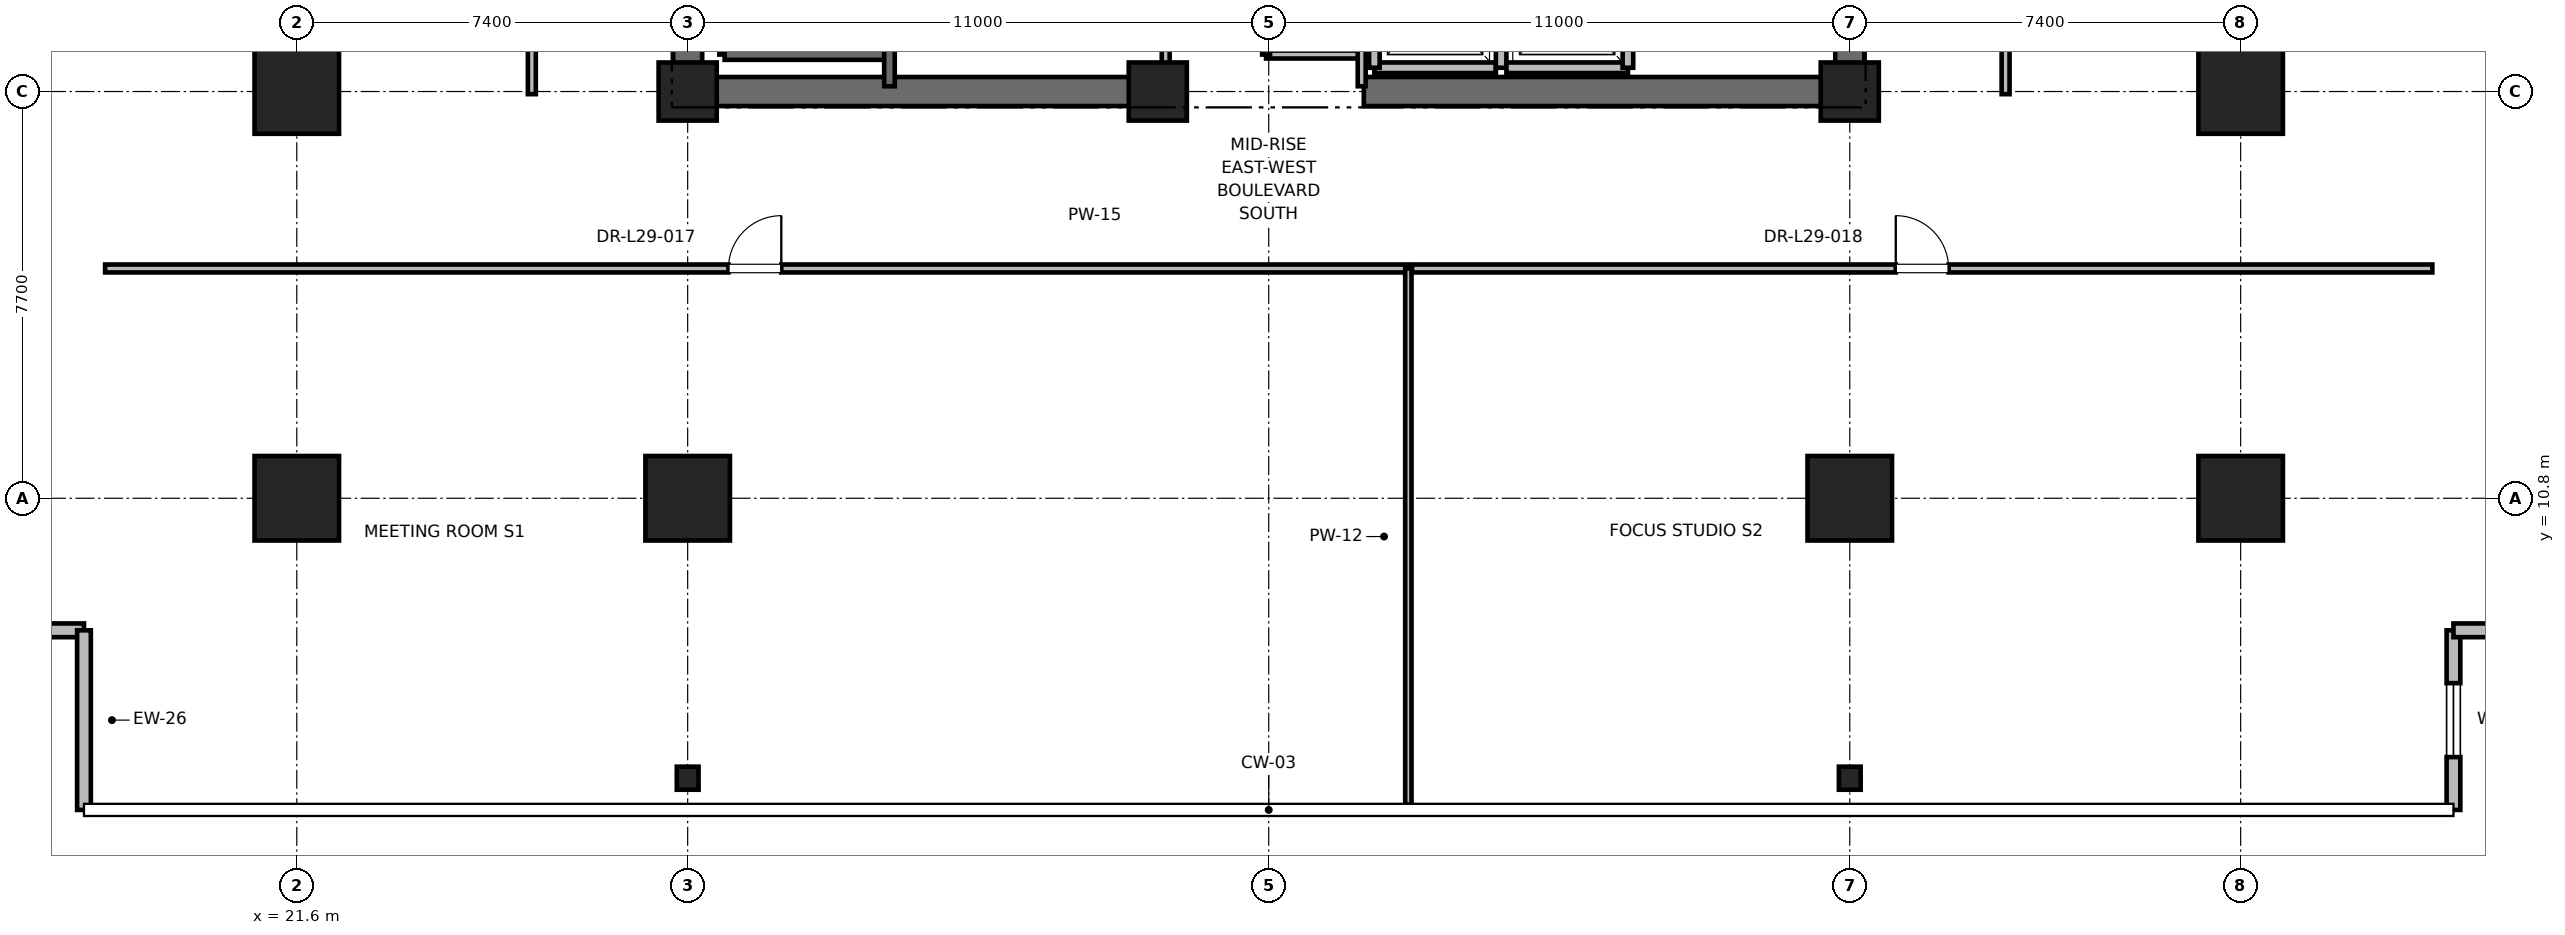
"""IFC4 building model, lengths in metres.
Left out: names, types, materials, properties, quantities, classifications, styles, units other than length and angle.
Written with IfcOpenShell. Run it as: python <this file> out.ifc"""

import sys

from ifc_helpers import new_model, si_unit, direction, frame, frame_2d, origin, origin_2d, place, context, subcontext, project, spatial, rectangle, i_section, extrude, element, fill, save


model = new_model("IFC4")
c1 = context("Model", 3, precision=1e-05, world=origin(), true_north=direction((0.0, 1.0)))
c2 = subcontext(c1, "Body", "Model", "MODEL_VIEW")
j1 = project(units=[si_unit("LENGTHUNIT", "METRE"), si_unit("PLANEANGLEUNIT", "RADIAN")], contexts=[c1])
p1 = place(None, origin())
s1 = spatial("IfcSite", under=j1, at=p1, CompositionType="ELEMENT")
p2 = place(p1, origin())
s2 = spatial("IfcBuilding", under=s1, at=p2, CompositionType="ELEMENT")
p3 = place(p2, frame((0.0, 0.0, 128.4)))
s3 = spatial("IfcBuildingStorey", under=s2, at=p3, CompositionType="ELEMENT", Elevation=128.4)
for number, where, z_axis, x_axis in (
    (1, (29.0, 10.8, 0.0), (0.0, 0.0, 1.0), (1.0, 0.0, 0.0)),
    (2, (51.0, 10.8, 0.0), (0.0, 0.0, 1.0), (1.0, 0.0, 0.0)),
    (3, (21.6, 18.5, 0.0), (0.0, 0.0, 1.0), (1.0, 0.0, 0.0)),
    (4, (58.4, 18.5, 0.0), (0.0, 0.0, 1.0), (1.0, 0.0, 0.0)),
    (5, (21.6, 10.8, 0.0), (0.0, 0.0, 1.0), (1.0, 0.0, 0.0)),
    (6, (58.4, 10.8, 0.0), (0.0, 0.0, 1.0), (1.0, 0.0, 0.0)),
):
    element("IfcColumn", number, at=place(p3, frame(where, z_axis=z_axis, x_axis=x_axis)), inside=s3, PredefinedType="COLUMN", context=c2, shape_type="SweptSolid", body=[
        extrude(rectangle(XDim=1.6, YDim=1.6, at=origin_2d()), origin(), (0.0, 0.0, 1.0), 4.0),
    ])
for number, where, z_axis, x_axis in (
    (7, (29.0, 5.5, 0.0), (0.0, 0.0, 1.0), (1.0, 0.0, 0.0)),
    (8, (51.0, 5.5, 0.0), (0.0, 0.0, 1.0), (1.0, 0.0, 0.0)),
):
    element("IfcColumn", number, at=place(p3, frame(where, z_axis=z_axis, x_axis=x_axis)), inside=s3, PredefinedType="COLUMN", context=c2, shape_type="SweptSolid", body=[
        extrude(i_section(OverallWidth=0.412, OverallDepth=0.437, WebThickness=0.036, FlangeThickness=0.058, FilletRadius=0.015, at=origin_2d()), origin(), (0.0, 0.0, 1.0), 4.0),
    ])
for number, where, z_axis, x_axis in (
    (9, (29.0, 18.5, 0.0), (0.0, 0.0, 1.0), (1.0, 0.0, 0.0)),
    (10, (51.0, 18.5, 0.0), (0.0, 0.0, 1.0), (1.0, 0.0, 0.0)),
    (11, (37.9, 18.5, 0.0), (0.0, 0.0, 1.0), (1.0, 0.0, 0.0)),
):
    element("IfcColumn", number, at=place(p3, frame(where, z_axis=z_axis, x_axis=x_axis)), inside=s3, PredefinedType="PILASTER", context=c2, shape_type="SweptSolid", body=[
        extrude(rectangle(XDim=1.1, YDim=1.1, at=origin_2d()), origin(), (0.0, 0.0, 1.0), 4.0),
    ])
for number, where, z_axis, x_axis in (
    (12, (29.0, 18.5, 0.0), (0.0, 0.0, 1.0), (1.0, 0.0, 0.0)),
    (13, (41.8, 18.5, 0.0), (0.0, 0.0, 1.0), (1.0, 0.0, 0.0)),
):
    element("IfcWall", number, at=place(p3, frame(where, z_axis=z_axis, x_axis=x_axis)), inside=s3, PredefinedType="SHEAR", context=c2, shape_type="SweptSolid", body=[
        extrude(rectangle(XDim=9.2, YDim=0.55, at=frame_2d((4.6, 0.0))), origin(), (0.0, 0.0, 1.0), 3.775),
    ])
p4 = place(p3, frame((29.0, 18.5, 0.0), z_axis=(0.0, 0.0, 1.0), x_axis=(0.0, 1.0, 0.0)))
e14 = element("IfcWall", 14, at=p4, inside=s3, PredefinedType="SHEAR", context=c2, shape_type="SweptSolid", body=[
    extrude(rectangle(XDim=8.8, YDim=0.55, at=frame_2d((4.4, 0.0))), origin(), (0.0, 0.0, 1.0), 3.775),
])
p5 = place(p3, frame((51.0, 18.5, 0.0), z_axis=(0.0, 0.0, 1.0), x_axis=(0.0, 1.0, 0.0)))
e15 = element("IfcWall", 15, at=p5, inside=s3, PredefinedType="SHEAR", context=c2, shape_type="SweptSolid", body=[
    extrude(rectangle(XDim=5.8, YDim=0.55, at=frame_2d((2.9, 0.0))), origin(), (0.0, 0.0, 1.0), 3.775),
])
p6 = place(p3, frame((13.771, 8.3, 0.0), z_axis=(0.0, 0.0, 1.0), x_axis=(1.0, 0.0, 0.0)))
e16 = element("IfcWall", 16, at=p6, inside=s3, PredefinedType="PARAPET", context=c2, shape_type="SweptSolid", body=[
    extrude(rectangle(XDim=3.8, YDim=0.26, at=frame_2d((1.9, 0.0))), origin(), (0.0, 0.0, 1.0), 3.775),
])
p7 = place(p6, frame((1.2, 0.0, 0.85)))
e17 = element("IfcOpeningElement", 17, at=p7, cuts=e16, PredefinedType="OPENING", context=c2, shape_type="SweptSolid", body=[
    extrude(rectangle(XDim=1.4, YDim=2.0, at=frame_2d((0.7, 1.0))), frame((0.0, 0.13, 0.0), z_axis=(0.0, -1.0, 0.0), x_axis=(1.0, 0.0, 0.0)), (0.0, 0.0, 1.0), 0.26),
])
p8 = place(p3, frame((17.571, 8.3, 0.0), z_axis=(0.0, 0.0, 1.0), x_axis=(0.0, -1.0, 0.0)))
e18 = element("IfcWall", 18, at=p8, inside=s3, PredefinedType="PARAPET", context=c2, shape_type="SweptSolid", body=[
    extrude(rectangle(XDim=3.4, YDim=0.26, at=frame_2d((1.7, 0.0))), origin(), (0.0, 0.0, 1.0), 3.775),
])
p9 = place(p3, frame((62.429, 4.9, 0.0), z_axis=(0.0, 0.0, 1.0), x_axis=(0.0, 1.0, 0.0)))
e19 = element("IfcWall", 19, at=p9, inside=s3, PredefinedType="PARAPET", context=c2, shape_type="SweptSolid", body=[
    extrude(rectangle(XDim=3.4, YDim=0.26, at=frame_2d((1.7, 0.0))), origin(), (0.0, 0.0, 1.0), 3.775),
])
p10 = place(p9, frame((1.0, 0.0, 0.85)))
e20 = element("IfcOpeningElement", 20, at=p10, cuts=e19, PredefinedType="OPENING", context=c2, shape_type="SweptSolid", body=[
    extrude(rectangle(XDim=1.4, YDim=2.0, at=frame_2d((0.7, 1.0))), frame((0.0, 0.13, 0.0), z_axis=(0.0, -1.0, 0.0), x_axis=(1.0, 0.0, 0.0)), (0.0, 0.0, 1.0), 0.26),
])
p11 = place(p3, frame((62.429, 8.3, 0.0), z_axis=(0.0, 0.0, 1.0), x_axis=(1.0, 0.0, 0.0)))
e21 = element("IfcWall", 21, at=p11, inside=s3, PredefinedType="PARAPET", context=c2, shape_type="SweptSolid", body=[
    extrude(rectangle(XDim=3.8, YDim=0.26, at=frame_2d((1.9, 0.0))), origin(), (0.0, 0.0, 1.0), 3.775),
])
p12 = place(p3, frame((29.7, 19.2, 0.0), z_axis=(0.0, 0.0, 1.0), x_axis=(0.0, 1.0, 0.0)))
e22 = element("IfcWall", 22, at=p12, inside=s3, PredefinedType="SOLIDWALL", context=c2, shape_type="SweptSolid", body=[
    extrude(rectangle(XDim=8.15, YDim=0.2, at=frame_2d((4.075, 0.0))), origin(), (0.0, 0.0, 1.0), 3.775),
])
p13 = place(p3, frame((29.7, 19.2, 0.0), z_axis=(0.0, 0.0, 1.0), x_axis=(1.0, 0.0, 0.0)))
e23 = element("IfcWall", 23, at=p13, inside=s3, PredefinedType="SOLIDWALL", context=c2, shape_type="SweptSolid", body=[
    extrude(rectangle(XDim=3.12, YDim=0.2, at=frame_2d((1.56, 0.0))), origin(), (0.0, 0.0, 1.0), 3.775),
])
p14 = place(p3, frame((32.82, 18.6, 0.0), z_axis=(0.0, 0.0, 1.0), x_axis=(0.0, 1.0, 0.0)))
e24 = element("IfcWall", 24, at=p14, inside=s3, PredefinedType="SOLIDWALL", context=c2, shape_type="SweptSolid", body=[
    extrude(rectangle(XDim=8.78, YDim=0.2, at=frame_2d((4.39, 0.0))), origin(), (0.0, 0.0, 1.0), 3.775),
])
p15 = place(p3, frame((42.0, 18.95, 0.0), z_axis=(0.0, 0.0, 1.0), x_axis=(1.0, 0.0, 0.0)))
e25 = element("IfcWall", 25, at=p15, inside=s3, PredefinedType="SOLIDWALL", context=c2, shape_type="SweptSolid", body=[
    extrude(rectangle(XDim=2.3, YDim=0.2, at=frame_2d((1.15, 0.0))), origin(), (0.0, 0.0, 1.0), 2.755),
])
p16 = place(p3, frame((42.0, 21.55, 0.0), z_axis=(0.0, 0.0, 1.0), x_axis=(0.0, -1.0, 0.0)))
e26 = element("IfcWall", 26, at=p16, inside=s3, PredefinedType="SOLIDWALL", context=c2, shape_type="SweptSolid", body=[
    extrude(rectangle(XDim=2.6, YDim=0.2, at=frame_2d((1.3, 0.0))), origin(), (0.0, 0.0, 1.0), 2.755),
])
p17 = place(p3, frame((44.4, 18.95, 0.0), z_axis=(0.0, 0.0, 1.0), x_axis=(0.0, 1.0, 0.0)))
e27 = element("IfcWall", 27, at=p17, inside=s3, PredefinedType="SOLIDWALL", context=c2, shape_type="SweptSolid", body=[
    extrude(rectangle(XDim=2.6, YDim=0.2, at=frame_2d((1.3, 0.0))), origin(), (0.0, 0.0, 1.0), 3.775),
])
p18 = place(p3, frame((44.5, 18.95, 0.0), z_axis=(0.0, 0.0, 1.0), x_axis=(1.0, 0.0, 0.0)))
e28 = element("IfcWall", 28, at=p18, inside=s3, PredefinedType="SOLIDWALL", context=c2, shape_type="SweptSolid", body=[
    extrude(rectangle(XDim=2.3, YDim=0.2, at=frame_2d((1.15, 0.0))), origin(), (0.0, 0.0, 1.0), 3.775),
])
p19 = place(p3, frame((46.8, 18.95, 0.0), z_axis=(0.0, 0.0, 1.0), x_axis=(0.0, 1.0, 0.0)))
e29 = element("IfcWall", 29, at=p19, inside=s3, PredefinedType="SOLIDWALL", context=c2, shape_type="SweptSolid", body=[
    extrude(rectangle(XDim=2.6, YDim=0.2, at=frame_2d((1.3, 0.0))), origin(), (0.0, 0.0, 1.0), 3.775),
])
p20 = place(p3, frame((39.95, 19.2, 0.0), z_axis=(0.0, 0.0, 1.0), x_axis=(1.0, 0.0, 0.0)))
e30 = element("IfcWall", 30, at=p20, inside=s3, PredefinedType="PARTITIONING", context=c2, shape_type="SweptSolid", body=[
    extrude(rectangle(XDim=1.81, YDim=0.15, at=frame_2d((0.905, 0.0))), origin(), (0.0, 0.0, 1.0), 2.85),
])
p21 = place(p3, frame((41.76, 18.6, 0.0), z_axis=(0.0, 0.0, 1.0), x_axis=(0.0, 1.0, 0.0)))
e31 = element("IfcWall", 31, at=p21, inside=s3, PredefinedType="PARTITIONING", context=c2, shape_type="SweptSolid", body=[
    extrude(rectangle(XDim=3.6, YDim=0.15, at=frame_2d((1.8, 0.0))), origin(), (0.0, 0.0, 1.0), 2.755),
])
p22 = place(p3, frame((39.95, 19.2, 0.0), z_axis=(0.0, 0.0, 1.0), x_axis=(0.0, 1.0, 0.0)))
e32 = element("IfcWall", 32, at=p22, inside=s3, PredefinedType="PARTITIONING", context=c2, shape_type="SweptSolid", body=[
    extrude(rectangle(XDim=3.0, YDim=0.15, at=frame_2d((1.5, 0.0))), origin(), (0.0, 0.0, 1.0), 2.85),
])
p23 = place(p22, frame((1.05, 0.0, 0.0)))
e33 = element("IfcOpeningElement", 33, at=p23, cuts=e32, PredefinedType="OPENING", context=c2, shape_type="SweptSolid", body=[
    extrude(rectangle(XDim=0.9, YDim=2.1, at=frame_2d((0.45, 1.05))), frame((0.0, 0.075, 0.0), z_axis=(0.0, -1.0, 0.0), x_axis=(1.0, 0.0, 0.0)), (0.0, 0.0, 1.0), 0.15),
])
p24 = place(p3, frame((38.05, 18.6, 0.0), z_axis=(0.0, 0.0, 1.0), x_axis=(0.0, 1.0, 0.0)))
e34 = element("IfcWall", 34, at=p24, inside=s3, PredefinedType="PARTITIONING", context=c2, shape_type="SweptSolid", body=[
    extrude(rectangle(XDim=8.78, YDim=0.15, at=frame_2d((4.39, 0.0))), origin(), (0.0, 0.0, 1.0), 2.755),
])
p25 = place(p24, frame((3.89, 0.0, 0.0)))
e35 = element("IfcOpeningElement", 35, at=p25, cuts=e34, PredefinedType="OPENING", context=c2, shape_type="SweptSolid", body=[
    extrude(rectangle(XDim=1.0, YDim=2.15, at=frame_2d((0.5, 1.075))), frame((0.0, 0.075, 0.0), z_axis=(0.0, -1.0, 0.0), x_axis=(1.0, 0.0, 0.0)), (0.0, 0.0, 1.0), 0.15),
])
p26 = place(p3, frame((17.971, 15.15, 0.0), z_axis=(0.0, 0.0, 1.0), x_axis=(1.0, 0.0, 0.0)))
e36 = element("IfcWall", 36, at=p26, inside=s3, PredefinedType="PARTITIONING", context=c2, shape_type="SweptSolid", body=[
    extrude(rectangle(XDim=24.672, YDim=0.15, at=frame_2d((12.336, 0.0))), origin(), (0.0, 0.0, 1.0), 2.85),
])
p27 = place(p26, frame((11.801, 0.0, 0.0)))
e37 = element("IfcOpeningElement", 37, at=p27, cuts=e36, PredefinedType="OPENING", context=c2, shape_type="SweptSolid", body=[
    extrude(rectangle(XDim=1.0, YDim=2.15, at=frame_2d((0.5, 1.075))), frame((0.0, 0.075, 0.0), z_axis=(0.0, -1.0, 0.0), x_axis=(1.0, 0.0, 0.0)), (0.0, 0.0, 1.0), 0.15),
])
p28 = place(p3, frame((42.643, 5.0, 0.0), z_axis=(0.0, 0.0, 1.0), x_axis=(0.0, 1.0, 0.0)))
e38 = element("IfcWall", 38, at=p28, inside=s3, PredefinedType="PARTITIONING", context=c2, shape_type="SweptSolid", body=[
    extrude(rectangle(XDim=10.15, YDim=0.12, at=frame_2d((5.075, 0.0))), origin(), (0.0, 0.0, 1.0), 2.405),
])
p29 = place(p3, frame((42.713, 15.15, 0.0), z_axis=(0.0, 0.0, 1.0), x_axis=(1.0, 0.0, 0.0)))
e39 = element("IfcWall", 39, at=p29, inside=s3, PredefinedType="PARTITIONING", context=c2, shape_type="SweptSolid", body=[
    extrude(rectangle(XDim=19.315, YDim=0.15, at=frame_2d((9.658, 0.0))), origin(), (0.0, 0.0, 1.0), 2.85),
])
p30 = place(p29, frame((9.158, 0.0, 0.0)))
e40 = element("IfcOpeningElement", 40, at=p30, cuts=e39, PredefinedType="OPENING", context=c2, shape_type="SweptSolid", body=[
    extrude(rectangle(XDim=1.0, YDim=2.15, at=frame_2d((0.5, 1.075))), frame((0.0, 0.075, 0.0), z_axis=(0.0, -1.0, 0.0), x_axis=(1.0, 0.0, 0.0)), (0.0, 0.0, 1.0), 0.15),
])
p31 = place(p3, frame((26.05, 18.45, 0.0), z_axis=(0.0, 0.0, 1.0), x_axis=(0.0, 1.0, 0.0)))
e41 = element("IfcWall", 41, at=p31, inside=s3, PredefinedType="PARTITIONING", context=c2, shape_type="SweptSolid", body=[
    extrude(rectangle(XDim=7.602, YDim=0.15, at=frame_2d((3.801, 0.0))), origin(), (0.0, 0.0, 1.0), 2.85),
])
p32 = place(p31, frame((3.341, 0.0, 0.0)))
e42 = element("IfcOpeningElement", 42, at=p32, cuts=e41, PredefinedType="OPENING", context=c2, shape_type="SweptSolid", body=[
    extrude(rectangle(XDim=1.0, YDim=2.15, at=frame_2d((0.5, 1.075))), frame((0.0, 0.075, 0.0), z_axis=(0.0, -1.0, 0.0), x_axis=(1.0, 0.0, 0.0)), (0.0, 0.0, 1.0), 0.15),
])
p33 = place(p3, frame((53.95, 18.45, 0.0), z_axis=(0.0, 0.0, 1.0), x_axis=(0.0, 1.0, 0.0)))
e43 = element("IfcWall", 43, at=p33, inside=s3, PredefinedType="PARTITIONING", context=c2, shape_type="SweptSolid", body=[
    extrude(rectangle(XDim=18.1, YDim=0.15, at=frame_2d((9.05, 0.0))), origin(), (0.0, 0.0, 1.0), 2.85),
])
p34 = place(p33, frame((8.55, 0.0, 0.0)))
e44 = element("IfcOpeningElement", 44, at=p34, cuts=e43, PredefinedType="OPENING", context=c2, shape_type="SweptSolid", body=[
    extrude(rectangle(XDim=1.0, YDim=2.15, at=frame_2d((0.5, 1.075))), frame((0.0, 0.075, 0.0), z_axis=(0.0, -1.0, 0.0), x_axis=(1.0, 0.0, 0.0)), (0.0, 0.0, 1.0), 0.15),
])
p35 = place(p10, origin())
e45 = element("IfcWindow", 45, at=p35, inside=s3, PartitioningType="SINGLE_PANEL", PredefinedType="WINDOW", context=c2, shape_type="SweptSolid", body=[
    extrude(rectangle(XDim=1.4, YDim=2.0, at=frame_2d((0.7, 1.0))), frame((0.0, 0.03, 0.0), z_axis=(0.0, -1.0, 0.0), x_axis=(1.0, 0.0, 0.0)), (0.0, 0.0, 1.0), 0.06),
])
fill(e20, e45)
p36 = place(p27, origin())
e46 = element("IfcDoor", 46, at=p36, inside=s3, OperationType="SINGLE_SWING_RIGHT", PredefinedType="DOOR", context=c2, shape_type="SweptSolid", body=[
    extrude(rectangle(XDim=1.0, YDim=2.15, at=frame_2d((0.5, 1.075))), frame((0.0, 0.025, 0.0), z_axis=(0.0, -1.0, 0.0), x_axis=(1.0, 0.0, 0.0)), (0.0, 0.0, 1.0), 0.05),
])
fill(e37, e46)
p37 = place(p30, origin())
e47 = element("IfcDoor", 47, at=p37, inside=s3, OperationType="SINGLE_SWING_LEFT", PredefinedType="DOOR", context=c2, shape_type="SweptSolid", body=[
    extrude(rectangle(XDim=1.0, YDim=2.15, at=frame_2d((0.5, 1.075))), frame((0.0, 0.025, 0.0), z_axis=(0.0, -1.0, 0.0), x_axis=(1.0, 0.0, 0.0)), (0.0, 0.0, 1.0), 0.05),
])
fill(e40, e47)
save(model, sys.argv[1])
